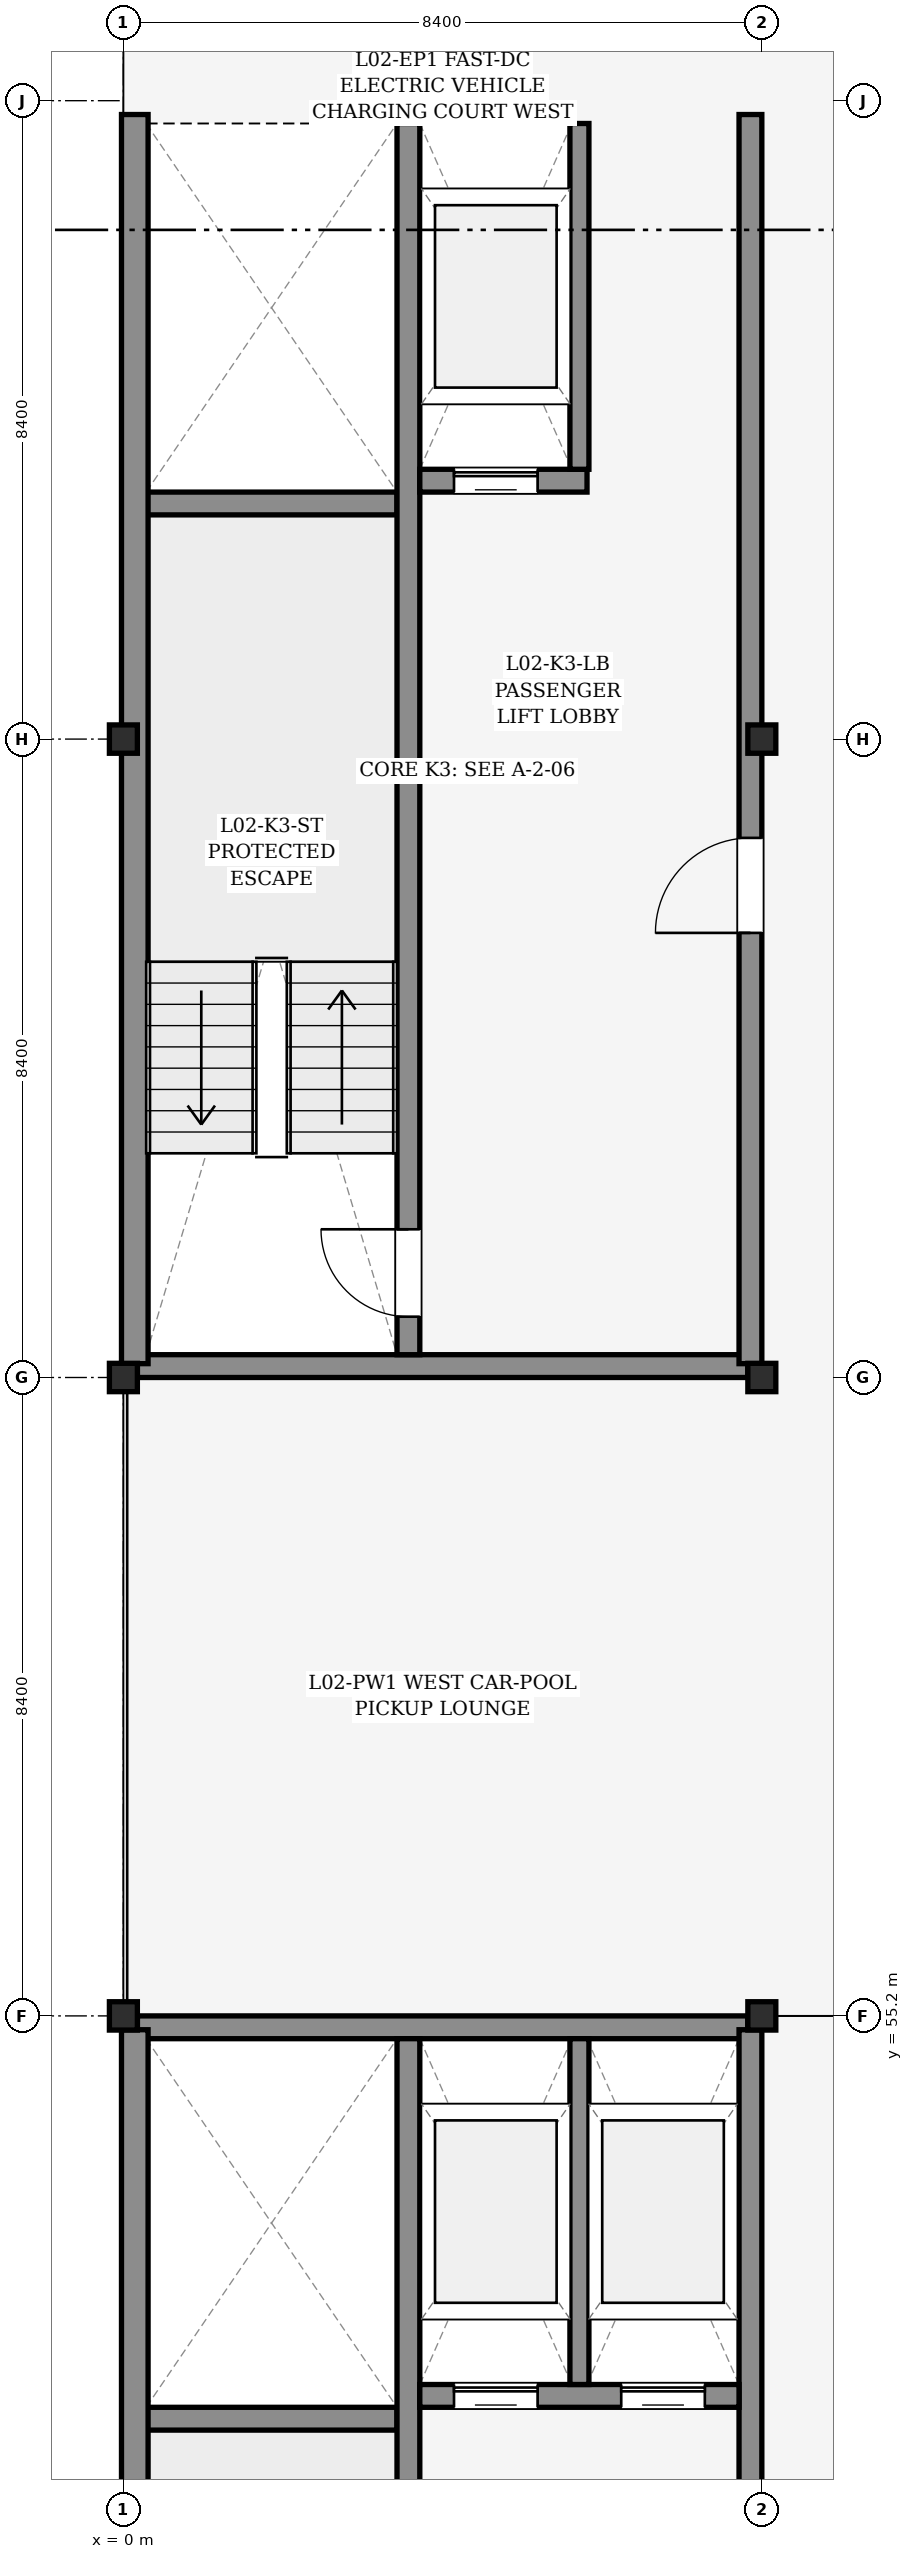
"""IFC4 building model, lengths in metres.
Left out: names, types, materials, properties, quantities, classifications, styles, units other than length and angle.
Written with IfcOpenShell. Run it as: python <this file> out.ifc"""

import sys

from ifc_helpers import new_model, si_unit, direction, frame, frame_2d, origin, origin_2d, place, context, subcontext, project, spatial, rectangle, i_section, extrude, element, fill, save


model = new_model("IFC4")
c1 = context("Model", 3, precision=1e-05, world=origin(), true_north=direction((0.0, 1.0)))
c2 = subcontext(c1, "Body", "Model", "MODEL_VIEW")
j1 = project(units=[si_unit("LENGTHUNIT", "METRE"), si_unit("PLANEANGLEUNIT", "RADIAN")], contexts=[c1])
p1 = place(None, origin())
s1 = spatial("IfcSite", under=j1, at=p1, CompositionType="ELEMENT")
p2 = place(p1, origin())
s2 = spatial("IfcBuilding", under=s1, at=p2, CompositionType="ELEMENT")
p3 = place(p2, frame((0.0, 0.0, 9.0)))
s3 = spatial("IfcBuildingStorey", under=s2, at=p3, CompositionType="ELEMENT", Elevation=9.0)
for number, where, z_axis, x_axis in (
    (1, (0.0, 55.2, 0.0), (0.0, 0.0, 1.0), (1.0, 0.0, 0.0)),
    (2, (0.0, 63.6, 0.0), (0.0, 0.0, 1.0), (1.0, 0.0, 0.0)),
    (3, (0.0, 72.0, 0.0), (0.0, 0.0, 1.0), (1.0, 0.0, 0.0)),
    (4, (0.0, 80.4, 0.0), (0.0, 0.0, 1.0), (1.0, 0.0, 0.0)),
    (5, (8.4, 55.2, 0.0), (0.0, 0.0, 1.0), (1.0, 0.0, 0.0)),
    (6, (8.4, 63.6, 0.0), (0.0, 0.0, 1.0), (1.0, 0.0, 0.0)),
    (7, (8.4, 72.0, 0.0), (0.0, 0.0, 1.0), (1.0, 0.0, 0.0)),
    (8, (8.4, 80.4, 0.0), (0.0, 0.0, 1.0), (1.0, 0.0, 0.0)),
):
    element("IfcColumn", number, at=place(p3, frame(where, z_axis=z_axis, x_axis=x_axis)), inside=s3, PredefinedType="COLUMN", context=c2, shape_type="SweptSolid", body=[
        extrude(i_section(OverallWidth=0.373, OverallDepth=0.368, WebThickness=0.014, FlangeThickness=0.024, FilletRadius=0.015, at=origin_2d()), origin(), (0.0, 0.0, 1.0), 3.6),
    ])
p4 = place(p3, frame((0.185, 55.05, 0.0), z_axis=(0.0, 0.0, 1.0), x_axis=(1.0, 0.0, 0.0)))
e9 = element("IfcWall", 9, at=p4, inside=s3, PredefinedType="SHEAR", context=c2, shape_type="SweptSolid", body=[
    extrude(rectangle(XDim=8.031, YDim=0.3, at=frame_2d((4.016, 0.0))), origin(), (0.0, 0.0, 1.0), 3.38),
])
p5 = place(p3, frame((0.3, 49.9, 0.0), z_axis=(0.0, 0.0, 1.0), x_axis=(1.0, 0.0, 0.0)))
e10 = element("IfcWall", 10, at=p5, inside=s3, PredefinedType="SHEAR", context=c2, shape_type="SweptSolid", body=[
    extrude(rectangle(XDim=3.3, YDim=0.3, at=frame_2d((1.65, 0.0))), origin(), (0.0, 0.0, 1.0), 3.38),
])
p6 = place(p3, frame((0.15, 38.582, 0.0), z_axis=(0.0, 0.0, 1.0), x_axis=(0.0, 1.0, 0.0)))
e11 = element("IfcWall", 11, at=p6, inside=s3, PredefinedType="SHEAR", context=c2, shape_type="SweptSolid", body=[
    extrude(rectangle(XDim=16.436, YDim=0.35, at=frame_2d((8.218, 0.0))), origin(), (0.0, 0.0, 1.0), 3.38),
])
p7 = place(p3, frame((8.25, 38.582, 0.0), z_axis=(0.0, 0.0, 1.0), x_axis=(0.0, 1.0, 0.0)))
e12 = element("IfcWall", 12, at=p7, inside=s3, PredefinedType="SHEAR", context=c2, shape_type="SweptSolid", body=[
    extrude(rectangle(XDim=16.436, YDim=0.3, at=frame_2d((8.218, 0.0))), origin(), (0.0, 0.0, 1.0), 3.38),
])
p8 = place(p7, frame((5.668, 0.0, 0.0)))
e13 = element("IfcOpeningElement", 13, at=p8, cuts=e12, PredefinedType="OPENING", context=c2, shape_type="SweptSolid", body=[
    extrude(rectangle(XDim=1.3, YDim=2.2, at=frame_2d((0.65, 1.1))), frame((0.0, 0.16, 0.0), z_axis=(0.0, -1.0, 0.0), x_axis=(1.0, 0.0, 0.0)), (0.0, 0.0, 1.0), 0.32),
])
p9 = place(p3, frame((3.75, 38.7, 0.0), z_axis=(0.0, 0.0, 1.0), x_axis=(0.0, 1.0, 0.0)))
e14 = element("IfcWall", 14, at=p9, inside=s3, PredefinedType="SHEAR", context=c2, shape_type="SweptSolid", body=[
    extrude(rectangle(XDim=16.2, YDim=0.3, at=frame_2d((8.1, 0.0))), origin(), (0.0, 0.0, 1.0), 3.38),
])
p10 = place(p9, frame((0.5, 0.0, 0.0)))
e15 = element("IfcOpeningElement", 15, at=p10, cuts=e14, PredefinedType="OPENING", context=c2, shape_type="SweptSolid", body=[
    extrude(rectangle(XDim=1.15, YDim=2.15, at=frame_2d((0.575, 1.075))), frame((0.0, 0.16, 0.0), z_axis=(0.0, -1.0, 0.0), x_axis=(1.0, 0.0, 0.0)), (0.0, 0.0, 1.0), 0.32),
])
p11 = place(p3, frame((3.9, 50.2, 0.0), z_axis=(0.0, 0.0, 1.0), x_axis=(1.0, 0.0, 0.0)))
e16 = element("IfcWall", 16, at=p11, inside=s3, PredefinedType="SHEAR", context=c2, shape_type="SweptSolid", body=[
    extrude(rectangle(XDim=4.2, YDim=0.3, at=frame_2d((2.1, 0.0))), origin(), (0.0, 0.0, 1.0), 3.38),
])
p12 = place(p11, frame((0.45, 0.0, 0.0)))
e17 = element("IfcOpeningElement", 17, at=p12, cuts=e16, PredefinedType="OPENING", context=c2, shape_type="SweptSolid", body=[
    extrude(rectangle(XDim=1.1, YDim=2.2, at=frame_2d((0.55, 1.1))), frame((0.0, 0.16, 0.0), z_axis=(0.0, -1.0, 0.0), x_axis=(1.0, 0.0, 0.0)), (0.0, 0.0, 1.0), 0.32),
])
p13 = place(p11, frame((2.65, 0.0, 0.0)))
e18 = element("IfcOpeningElement", 18, at=p13, cuts=e16, PredefinedType="OPENING", context=c2, shape_type="SweptSolid", body=[
    extrude(rectangle(XDim=1.1, YDim=2.2, at=frame_2d((0.55, 1.1))), frame((0.0, 0.16, 0.0), z_axis=(0.0, -1.0, 0.0), x_axis=(1.0, 0.0, 0.0)), (0.0, 0.0, 1.0), 0.32),
])
p14 = place(p3, frame((6.0, 50.35, 0.0), z_axis=(0.0, 0.0, 1.0), x_axis=(0.0, 1.0, 0.0)))
e19 = element("IfcWall", 19, at=p14, inside=s3, PredefinedType="PARTITIONING", context=c2, shape_type="SweptSolid", body=[
    extrude(rectangle(XDim=4.55, YDim=0.25, at=frame_2d((2.275, 0.0))), origin(), (0.0, 0.0, 1.0), 2.525),
])
for number, where, z_axis, x_axis in (
    (20, (0.185, 63.75, 0.0), (0.0, 0.0, 1.0), (1.0, 0.0, 0.0)),
    (21, (0.185, 80.25, 0.0), (0.0, 0.0, 1.0), (1.0, 0.0, 0.0)),
):
    element("IfcWall", number, at=place(p3, frame(where, z_axis=z_axis, x_axis=x_axis)), inside=s3, PredefinedType="SHEAR", context=c2, shape_type="SweptSolid", body=[
        extrude(rectangle(XDim=8.031, YDim=0.3, at=frame_2d((4.016, 0.0))), origin(), (0.0, 0.0, 1.0), 3.38),
    ])
p15 = place(p3, frame((0.3, 75.1, 0.0), z_axis=(0.0, 0.0, 1.0), x_axis=(1.0, 0.0, 0.0)))
e22 = element("IfcWall", 22, at=p15, inside=s3, PredefinedType="SHEAR", context=c2, shape_type="SweptSolid", body=[
    extrude(rectangle(XDim=3.3, YDim=0.3, at=frame_2d((1.65, 0.0))), origin(), (0.0, 0.0, 1.0), 3.38),
])
p16 = place(p3, frame((0.15, 63.782, 0.0), z_axis=(0.0, 0.0, 1.0), x_axis=(0.0, 1.0, 0.0)))
e23 = element("IfcWall", 23, at=p16, inside=s3, PredefinedType="SHEAR", context=c2, shape_type="SweptSolid", body=[
    extrude(rectangle(XDim=16.436, YDim=0.35, at=frame_2d((8.218, 0.0))), origin(), (0.0, 0.0, 1.0), 3.38),
])
p17 = place(p3, frame((8.25, 63.782, 0.0), z_axis=(0.0, 0.0, 1.0), x_axis=(0.0, 1.0, 0.0)))
e24 = element("IfcWall", 24, at=p17, inside=s3, PredefinedType="SHEAR", context=c2, shape_type="SweptSolid", body=[
    extrude(rectangle(XDim=16.436, YDim=0.3, at=frame_2d((8.218, 0.0))), origin(), (0.0, 0.0, 1.0), 3.38),
])
p18 = place(p17, frame((5.668, 0.0, 0.0)))
e25 = element("IfcOpeningElement", 25, at=p18, cuts=e24, PredefinedType="OPENING", context=c2, shape_type="SweptSolid", body=[
    extrude(rectangle(XDim=1.25, YDim=2.15, at=frame_2d((0.625, 1.075))), frame((0.0, 0.16, 0.0), z_axis=(0.0, -1.0, 0.0), x_axis=(1.0, 0.0, 0.0)), (0.0, 0.0, 1.0), 0.32),
])
p19 = place(p3, frame((3.75, 63.9, 0.0), z_axis=(0.0, 0.0, 1.0), x_axis=(0.0, 1.0, 0.0)))
e26 = element("IfcWall", 26, at=p19, inside=s3, PredefinedType="SHEAR", context=c2, shape_type="SweptSolid", body=[
    extrude(rectangle(XDim=16.2, YDim=0.3, at=frame_2d((8.1, 0.0))), origin(), (0.0, 0.0, 1.0), 3.38),
])
p20 = place(p19, frame((0.5, 0.0, 0.0)))
e27 = element("IfcOpeningElement", 27, at=p20, cuts=e26, PredefinedType="OPENING", context=c2, shape_type="SweptSolid", body=[
    extrude(rectangle(XDim=1.15, YDim=2.15, at=frame_2d((0.575, 1.075))), frame((0.0, 0.16, 0.0), z_axis=(0.0, -1.0, 0.0), x_axis=(1.0, 0.0, 0.0)), (0.0, 0.0, 1.0), 0.32),
])
p21 = place(p3, frame((3.9, 75.4, 0.0), z_axis=(0.0, 0.0, 1.0), x_axis=(1.0, 0.0, 0.0)))
e28 = element("IfcWall", 28, at=p21, inside=s3, PredefinedType="SHEAR", context=c2, shape_type="SweptSolid", body=[
    extrude(rectangle(XDim=2.2, YDim=0.3, at=frame_2d((1.1, 0.0))), origin(), (0.0, 0.0, 1.0), 3.38),
])
p22 = place(p21, frame((0.45, 0.0, 0.0)))
e29 = element("IfcOpeningElement", 29, at=p22, cuts=e28, PredefinedType="OPENING", context=c2, shape_type="SweptSolid", body=[
    extrude(rectangle(XDim=1.1, YDim=2.2, at=frame_2d((0.55, 1.1))), frame((0.0, 0.16, 0.0), z_axis=(0.0, -1.0, 0.0), x_axis=(1.0, 0.0, 0.0)), (0.0, 0.0, 1.0), 0.32),
])
p23 = place(p3, frame((6.0, 75.55, 0.0), z_axis=(0.0, 0.0, 1.0), x_axis=(0.0, 1.0, 0.0)))
e30 = element("IfcWall", 30, at=p23, inside=s3, PredefinedType="PARTITIONING", context=c2, shape_type="SweptSolid", body=[
    extrude(rectangle(XDim=4.55, YDim=0.25, at=frame_2d((2.275, 0.0))), origin(), (0.0, 0.0, 1.0), 2.525),
])
p24 = place(p12, origin())
e31 = element("IfcDoor", 31, at=p24, inside=s3, OperationType="SLIDING_TO_LEFT", PredefinedType="DOOR", context=c2, shape_type="SweptSolid", body=[
    extrude(rectangle(XDim=1.1, YDim=2.2, at=frame_2d((0.55, 1.1))), frame((0.0, 0.025, 0.0), z_axis=(0.0, -1.0, 0.0), x_axis=(1.0, 0.0, 0.0)), (0.0, 0.0, 1.0), 0.05),
])
fill(e17, e31)
p25 = place(p13, origin())
e32 = element("IfcDoor", 32, at=p25, inside=s3, OperationType="SLIDING_TO_LEFT", PredefinedType="DOOR", context=c2, shape_type="SweptSolid", body=[
    extrude(rectangle(XDim=1.1, YDim=2.2, at=frame_2d((0.55, 1.1))), frame((0.0, 0.025, 0.0), z_axis=(0.0, -1.0, 0.0), x_axis=(1.0, 0.0, 0.0)), (0.0, 0.0, 1.0), 0.05),
])
fill(e18, e32)
p26 = place(p18, origin())
e33 = element("IfcDoor", 33, at=p26, inside=s3, OperationType="SINGLE_SWING_LEFT", PredefinedType="DOOR", context=c2, shape_type="SweptSolid", body=[
    extrude(rectangle(XDim=1.25, YDim=2.15, at=frame_2d((0.625, 1.075))), frame((0.0, 0.025, 0.0), z_axis=(0.0, -1.0, 0.0), x_axis=(1.0, 0.0, 0.0)), (0.0, 0.0, 1.0), 0.05),
])
fill(e25, e33)
p27 = place(p20, frame((1.15, 0.0, 0.0), z_axis=(0.0, 0.0, 1.0), x_axis=(-1.0, 0.0, 0.0)))
e34 = element("IfcDoor", 34, at=p27, inside=s3, OperationType="SINGLE_SWING_LEFT", PredefinedType="DOOR", context=c2, shape_type="SweptSolid", body=[
    extrude(rectangle(XDim=1.15, YDim=2.15, at=frame_2d((0.575, 1.075))), frame((0.0, 0.025, 0.0), z_axis=(0.0, -1.0, 0.0), x_axis=(1.0, 0.0, 0.0)), (0.0, 0.0, 1.0), 0.05),
])
fill(e27, e34)
p28 = place(p22, origin())
e35 = element("IfcDoor", 35, at=p28, inside=s3, OperationType="SLIDING_TO_LEFT", PredefinedType="DOOR", context=c2, shape_type="SweptSolid", body=[
    extrude(rectangle(XDim=1.1, YDim=2.2, at=frame_2d((0.55, 1.1))), frame((0.0, 0.025, 0.0), z_axis=(0.0, -1.0, 0.0), x_axis=(1.0, 0.0, 0.0)), (0.0, 0.0, 1.0), 0.05),
])
fill(e29, e35)
save(model, sys.argv[1])
